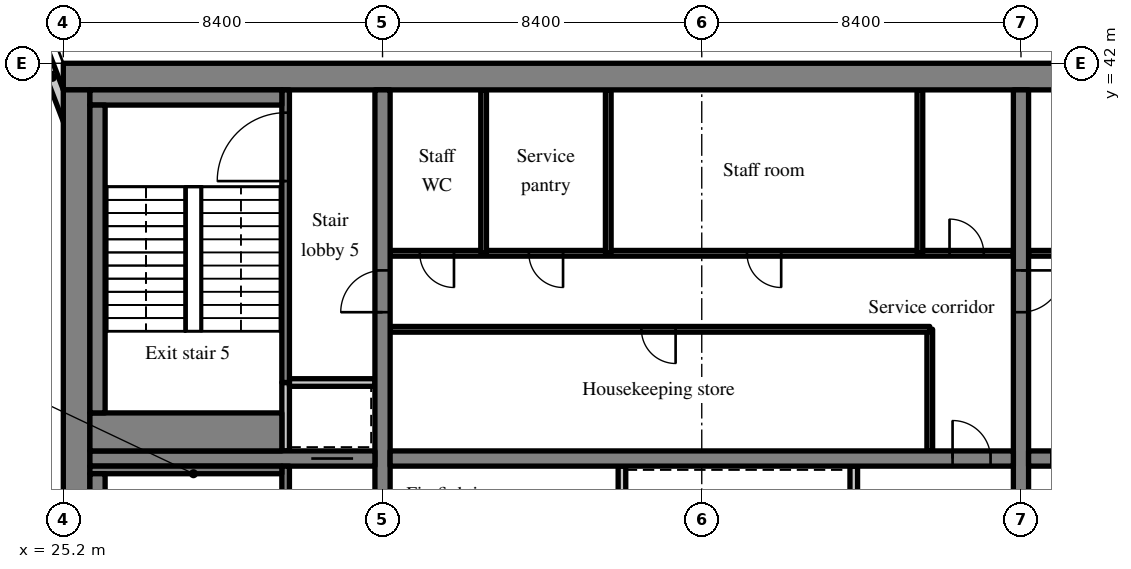
"""IFC4 building model, lengths in metres.
Left out: names, types, materials, properties, quantities, classifications, styles, units other than length and angle.
Written with IfcOpenShell. Run it as: python <this file> out.ifc"""

import sys

from ifc_helpers import new_model, si_unit, direction, frame, frame_2d, origin, place, context, subcontext, project, spatial, rectangle, extrude, source, transform, mapped, element, fill, save


model = new_model("IFC4")
c1 = context("Model", 3, precision=1e-05, world=origin(), true_north=direction((0.0, 1.0)))
c2 = subcontext(c1, "Body", "Model", "MODEL_VIEW")
j1 = project(units=[si_unit("LENGTHUNIT", "METRE"), si_unit("PLANEANGLEUNIT", "RADIAN")], contexts=[c1])
p1 = place(None, origin())
s1 = spatial("IfcSite", under=j1, at=p1, CompositionType="ELEMENT")
p2 = place(p1, origin())
s2 = spatial("IfcBuilding", under=s1, at=p2, CompositionType="ELEMENT")
p3 = place(p2, frame((0.0, 0.0, 197.2)))
s3 = spatial("IfcBuildingStorey", under=s2, at=p3, CompositionType="ELEMENT", Elevation=197.2)
m1 = source(origin(), c2, "Body", "SweptSolid", [
    extrude(rectangle(XDim=50.4, YDim=0.7, at=frame_2d((25.2, 0.0))), origin(), (0.0, 0.0, 1.0), 3.52),
])
p4 = place(p3, frame((25.2, 41.65, 0.0), z_axis=(0.0, 0.0, 1.0), x_axis=(1.0, 0.0, 0.0)))
e1 = element("IfcWall", 1, at=p4, inside=s3, PredefinedType="SHEAR", context=c2, shape_type="MappedRepresentation", body=[
    mapped(m1, transform((0.0, 0.0, 0.0), scale=1.0)),
])
m2 = source(origin(), c2, "Body", "SweptSolid", [
    extrude(rectangle(XDim=18.6, YDim=0.7, at=frame_2d((9.3, 0.0))), origin(), (0.0, 0.0, 1.0), 3.52),
])
p5 = place(p3, frame((25.55, 22.7, 0.0), z_axis=(0.0, 0.0, 1.0), x_axis=(0.0, 1.0, 0.0)))
e2 = element("IfcWall", 2, at=p5, inside=s3, PredefinedType="SHEAR", context=c2, shape_type="MappedRepresentation", body=[
    mapped(m2, transform((0.0, 0.0, 0.0), scale=1.0)),
])
m3 = source(origin(), c2, "Body", "SweptSolid", [
    extrude(rectangle(XDim=18.6, YDim=0.4, at=frame_2d((9.3, 0.0))), origin(), (0.0, 0.0, 1.0), 3.52),
])
p6 = place(p3, frame((33.6, 22.7, 0.0), z_axis=(0.0, 0.0, 1.0), x_axis=(0.0, 1.0, 0.0)))
e3 = element("IfcWall", 3, at=p6, inside=s3, PredefinedType="SHEAR", context=c2, shape_type="MappedRepresentation", body=[
    mapped(m3, transform((0.0, 0.0, 0.0), scale=1.0)),
])
m4 = source(origin(), c2, "Body", "SweptSolid", [
    extrude(rectangle(XDim=1.1, YDim=2.1, at=frame_2d((0.55, 1.05))), frame((0.0, 0.21, 0.0), z_axis=(0.0, -1.0, 0.0), x_axis=(1.0, 0.0, 0.0)), (0.0, 0.0, 1.0), 0.42),
])
p7 = place(p6, frame((12.75, 0.0, 0.0)))
e4 = element("IfcOpeningElement", 4, at=p7, cuts=e3, PredefinedType="OPENING", context=c2, shape_type="MappedRepresentation", body=[
    mapped(m4, transform((0.0, 0.0, 0.0), scale=1.0)),
])
p8 = place(p3, frame((50.4, 22.7, 0.0), z_axis=(0.0, 0.0, 1.0), x_axis=(0.0, 1.0, 0.0)))
e5 = element("IfcWall", 5, at=p8, inside=s3, PredefinedType="SHEAR", context=c2, shape_type="MappedRepresentation", body=[
    mapped(m3, transform((0.0, 0.0, 0.0), scale=1.0)),
])
p9 = place(p8, frame((12.75, 0.0, 0.0)))
e6 = element("IfcOpeningElement", 6, at=p9, cuts=e5, PredefinedType="OPENING", context=c2, shape_type="MappedRepresentation", body=[
    mapped(m4, transform((0.0, 0.0, 0.0), scale=1.0)),
])
m5 = source(origin(), c2, "Body", "SweptSolid", [
    extrude(rectangle(XDim=7.5, YDim=0.4, at=frame_2d((3.75, 0.0))), origin(), (0.0, 0.0, 1.0), 3.52),
])
p10 = place(p3, frame((25.9, 31.6, 0.0), z_axis=(0.0, 0.0, 1.0), x_axis=(1.0, 0.0, 0.0)))
e7 = element("IfcWall", 7, at=p10, inside=s3, PredefinedType="SHEAR", context=c2, shape_type="MappedRepresentation", body=[
    mapped(m5, transform((0.0, 0.0, 0.0), scale=1.0)),
])
p11 = place(p10, frame((5.825, 0.0, 0.0)))
e8 = element("IfcOpeningElement", 8, at=p11, cuts=e7, PredefinedType="OPENING", context=c2, shape_type="MappedRepresentation", body=[
    mapped(m4, transform((0.0, 0.0, 0.0), scale=1.0)),
])
m6 = source(origin(), c2, "Body", "SweptSolid", [
    extrude(rectangle(XDim=16.4, YDim=0.4, at=frame_2d((8.2, 0.0))), origin(), (0.0, 0.0, 1.0), 3.52),
])
p12 = place(p3, frame((33.8, 31.6, 0.0), z_axis=(0.0, 0.0, 1.0), x_axis=(1.0, 0.0, 0.0)))
e9 = element("IfcWall", 9, at=p12, inside=s3, PredefinedType="SHEAR", context=c2, shape_type="MappedRepresentation", body=[
    mapped(m6, transform((0.0, 0.0, 0.0), scale=1.0)),
])
m7 = source(origin(), c2, "Body", "SweptSolid", [
    extrude(rectangle(XDim=1.0, YDim=2.1, at=frame_2d((0.5, 1.05))), frame((0.0, 0.21, 0.0), z_axis=(0.0, -1.0, 0.0), x_axis=(1.0, 0.0, 0.0)), (0.0, 0.0, 1.0), 0.42),
])
p13 = place(p12, frame((14.8, 0.0, 0.0)))
e10 = element("IfcOpeningElement", 10, at=p13, cuts=e9, PredefinedType="OPENING", context=c2, shape_type="MappedRepresentation", body=[
    mapped(m7, transform((0.0, 0.0, 0.0), scale=1.0)),
])
p14 = place(p3, frame((50.6, 31.6, 0.0), z_axis=(0.0, 0.0, 1.0), x_axis=(1.0, 0.0, 0.0)))
e11 = element("IfcWall", 11, at=p14, inside=s3, PredefinedType="SHEAR", context=c2, shape_type="MappedRepresentation", body=[
    mapped(m6, transform((0.0, 0.0, 0.0), scale=1.0)),
])
p15 = place(p14, frame((0.6, 0.0, 0.0)))
e12 = element("IfcOpeningElement", 12, at=p15, cuts=e11, PredefinedType="OPENING", context=c2, shape_type="MappedRepresentation", body=[
    mapped(m7, transform((0.0, 0.0, 0.0), scale=1.0)),
])
m8 = source(origin(), c2, "Body", "SweptSolid", [
    extrude(rectangle(XDim=3.559, YDim=0.3, at=frame_2d((1.78, 0.0))), origin(), (0.0, 0.0, 1.0), 3.52),
])
p16 = place(p3, frame((25.55, 39.969, 0.0), z_axis=(0.0, 0.0, 1.0), x_axis=(-0.35779745313, 0.933799219604, 0.0)))
e13 = element("IfcWall", 13, at=p16, inside=s3, PredefinedType="SOLIDWALL", context=c2, shape_type="MappedRepresentation", body=[
    mapped(m8, transform((0.0, 0.0, 0.0), scale=1.0)),
])
m9 = source(origin(), c2, "Body", "SweptSolid", [
    extrude(rectangle(XDim=1.5, YDim=2.0, at=frame_2d((0.75, 1.0))), frame((0.0, 0.16, 0.0), z_axis=(0.0, -1.0, 0.0), x_axis=(1.0, 0.0, 0.0)), (0.0, 0.0, 1.0), 0.32),
])
p17 = place(p16, frame((1.903, 0.0, 0.9)))
e14 = element("IfcOpeningElement", 14, at=p17, cuts=e13, PredefinedType="OPENING", context=c2, shape_type="MappedRepresentation", body=[
    mapped(m9, transform((0.0, 0.0, 0.0), scale=1.0)),
])
m10 = source(origin(), c2, "Body", "SweptSolid", [
    extrude(rectangle(XDim=8.7, YDim=0.2, at=frame_2d((4.35, 0.0))), origin(), (0.0, 0.0, 1.0), 3.52),
])
p18 = place(p3, frame((39.9, 22.7, 0.0), z_axis=(0.0, 0.0, 1.0), x_axis=(0.0, 1.0, 0.0)))
e15 = element("IfcWall", 15, at=p18, inside=s3, PredefinedType="PARTITIONING", context=c2, shape_type="MappedRepresentation", body=[
    mapped(m10, transform((0.0, 0.0, 0.0), scale=1.0)),
])
m11 = source(origin(), c2, "Body", "SweptSolid", [
    extrude(rectangle(XDim=0.9, YDim=2.1, at=frame_2d((0.45, 1.05))), frame((0.0, 0.11, 0.0), z_axis=(0.0, -1.0, 0.0), x_axis=(1.0, 0.0, 0.0)), (0.0, 0.0, 1.0), 0.22),
])
p19 = place(p18, frame((3.85, 0.0, 0.0)))
e16 = element("IfcOpeningElement", 16, at=p19, cuts=e15, PredefinedType="OPENING", context=c2, shape_type="MappedRepresentation", body=[
    mapped(m11, transform((0.0, 0.0, 0.0), scale=1.0)),
])
m12 = source(origin(), c2, "Body", "SweptSolid", [
    extrude(rectangle(XDim=2.6, YDim=0.2, at=frame_2d((1.3, 0.0))), origin(), (0.0, 0.0, 1.0), 3.52),
])
p20 = place(p3, frame((46.0, 28.8, 0.0), z_axis=(0.0, 0.0, 1.0), x_axis=(0.0, 1.0, 0.0)))
e17 = element("IfcWall", 17, at=p20, inside=s3, PredefinedType="SOLIDWALL", context=c2, shape_type="MappedRepresentation", body=[
    mapped(m12, transform((0.0, 0.0, 0.0), scale=1.0)),
])
m13 = source(origin(), c2, "Body", "SweptSolid", [
    extrude(rectangle(XDim=3.2, YDim=0.15, at=frame_2d((1.6, 0.0))), origin(), (0.0, 0.0, 1.0), 3.52),
])
p21 = place(p3, frame((48.0, 31.8, 0.0), z_axis=(0.0, 0.0, 1.0), x_axis=(0.0, 1.0, 0.0)))
e18 = element("IfcWall", 18, at=p21, inside=s3, PredefinedType="PARTITIONING", context=c2, shape_type="MappedRepresentation", body=[
    mapped(m13, transform((0.0, 0.0, 0.0), scale=1.0)),
])
m14 = source(origin(), c2, "Body", "SweptSolid", [
    extrude(rectangle(XDim=14.2, YDim=0.15, at=frame_2d((7.1, 0.0))), origin(), (0.0, 0.0, 1.0), 3.52),
])
p22 = place(p3, frame((33.8, 35.0, 0.0), z_axis=(0.0, 0.0, 1.0), x_axis=(1.0, 0.0, 0.0)))
e19 = element("IfcWall", 19, at=p22, inside=s3, PredefinedType="PARTITIONING", context=c2, shape_type="MappedRepresentation", body=[
    mapped(m14, transform((0.0, 0.0, 0.0), scale=1.0)),
])
m15 = source(origin(), c2, "Body", "SweptSolid", [
    extrude(rectangle(XDim=0.9, YDim=2.1, at=frame_2d((0.45, 1.05))), frame((0.0, 0.085, 0.0), z_axis=(0.0, -1.0, 0.0), x_axis=(1.0, 0.0, 0.0)), (0.0, 0.0, 1.0), 0.17),
])
p23 = place(p22, frame((6.612, 0.0, 0.0)))
e20 = element("IfcOpeningElement", 20, at=p23, cuts=e19, PredefinedType="OPENING", context=c2, shape_type="MappedRepresentation", body=[
    mapped(m15, transform((0.0, 0.0, 0.0), scale=1.0)),
])
m16 = source(origin(), c2, "Body", "SweptSolid", [
    extrude(rectangle(XDim=16.4, YDim=0.15, at=frame_2d((8.2, 0.0))), origin(), (0.0, 0.0, 1.0), 3.52),
])
p24 = place(p3, frame((33.8, 37.0, 0.0), z_axis=(0.0, 0.0, 1.0), x_axis=(1.0, 0.0, 0.0)))
e21 = element("IfcWall", 21, at=p24, inside=s3, PredefinedType="PARTITIONING", context=c2, shape_type="MappedRepresentation", body=[
    mapped(m16, transform((0.0, 0.0, 0.0), scale=1.0)),
])
p25 = place(p24, frame((0.78, 0.0, 0.0)))
e22 = element("IfcOpeningElement", 22, at=p25, cuts=e21, PredefinedType="OPENING", context=c2, shape_type="MappedRepresentation", body=[
    mapped(m15, transform((0.0, 0.0, 0.0), scale=1.0)),
])
p26 = place(p24, frame((3.65, 0.0, 0.0)))
e23 = element("IfcOpeningElement", 23, at=p26, cuts=e21, PredefinedType="OPENING", context=c2, shape_type="MappedRepresentation", body=[
    mapped(m15, transform((0.0, 0.0, 0.0), scale=1.0)),
])
p27 = place(p24, frame((9.39, 0.0, 0.0)))
e24 = element("IfcOpeningElement", 24, at=p27, cuts=e21, PredefinedType="OPENING", context=c2, shape_type="MappedRepresentation", body=[
    mapped(m15, transform((0.0, 0.0, 0.0), scale=1.0)),
])
p28 = place(p24, frame((14.72, 0.0, 0.0)))
e25 = element("IfcOpeningElement", 25, at=p28, cuts=e21, PredefinedType="OPENING", context=c2, shape_type="MappedRepresentation", body=[
    mapped(m15, transform((0.0, 0.0, 0.0), scale=1.0)),
])
m17 = source(origin(), c2, "Body", "SweptSolid", [
    extrude(rectangle(XDim=4.3, YDim=0.15, at=frame_2d((2.15, 0.0))), origin(), (0.0, 0.0, 1.0), 3.52),
])
for number, where, z_axis, x_axis in (
    (26, (36.26, 37.0, 0.0), (0.0, 0.0, 1.0), (0.0, 1.0, 0.0)),
    (27, (39.54, 37.0, 0.0), (0.0, 0.0, 1.0), (0.0, 1.0, 0.0)),
    (28, (47.74, 37.0, 0.0), (0.0, 0.0, 1.0), (0.0, 1.0, 0.0)),
):
    element("IfcWall", number, at=place(p3, frame(where, z_axis=z_axis, x_axis=x_axis)), inside=s3, PredefinedType="PARTITIONING", context=c2, shape_type="MappedRepresentation", body=[
        mapped(m17, transform((0.0, 0.0, 0.0), scale=1.0)),
    ])
p29 = place(p3, frame((67.0, 37.0, 0.0), z_axis=(0.0, 0.0, 1.0), x_axis=(-1.0, 0.0, 0.0)))
e29 = element("IfcWall", 29, at=p29, inside=s3, PredefinedType="PARTITIONING", context=c2, shape_type="MappedRepresentation", body=[
    mapped(m16, transform((0.0, 0.0, 0.0), scale=1.0)),
])
p30 = place(p29, frame((6.52, 0.0, 0.0)))
e30 = element("IfcOpeningElement", 30, at=p30, cuts=e29, PredefinedType="OPENING", context=c2, shape_type="MappedRepresentation", body=[
    mapped(m15, transform((0.0, 0.0, 0.0), scale=1.0)),
])
p31 = place(p29, frame((14.72, 0.0, 0.0)))
e31 = element("IfcOpeningElement", 31, at=p31, cuts=e29, PredefinedType="OPENING", context=c2, shape_type="MappedRepresentation", body=[
    mapped(m15, transform((0.0, 0.0, 0.0), scale=1.0)),
])
m18 = source(origin(), c2, "Body", "SweptSolid", [
    extrude(rectangle(XDim=8.7, YDim=0.2, at=frame_2d((4.35, 0.0))), origin(), (0.0, 0.0, 1.0), 3.52),
])
p32 = place(p3, frame((31.05, 22.7, 0.0), z_axis=(0.0, 0.0, 1.0), x_axis=(0.0, 1.0, 0.0)))
e32 = element("IfcWall", 32, at=p32, inside=s3, PredefinedType="SOLIDWALL", context=c2, shape_type="MappedRepresentation", body=[
    mapped(m18, transform((0.0, 0.0, 0.0), scale=1.0)),
])
m19 = source(origin(), c2, "Body", "SweptSolid", [
    extrude(rectangle(XDim=1.2, YDim=2.1, at=frame_2d((0.6, 1.05))), frame((0.0, 0.11, 0.0), z_axis=(0.0, -1.0, 0.0), x_axis=(1.0, 0.0, 0.0)), (0.0, 0.0, 1.0), 0.22),
])
p33 = place(p32, frame((6.8, 0.0, 0.0)))
e33 = element("IfcOpeningElement", 33, at=p33, cuts=e32, PredefinedType="OPENING", context=c2, shape_type="MappedRepresentation", body=[
    mapped(m19, transform((0.0, 0.0, 0.0), scale=1.0)),
])
m20 = source(origin(), c2, "Body", "SweptSolid", [
    extrude(rectangle(XDim=1.8, YDim=0.2, at=frame_2d((0.9, 0.0))), origin(), (0.0, 0.0, 1.0), 3.52),
])
p34 = place(p3, frame((31.05, 31.8, 0.0), z_axis=(0.0, 0.0, 1.0), x_axis=(0.0, 1.0, 0.0)))
e34 = element("IfcWall", 34, at=p34, inside=s3, PredefinedType="SOLIDWALL", context=c2, shape_type="MappedRepresentation", body=[
    mapped(m20, transform((0.0, 0.0, 0.0), scale=1.0)),
])
m21 = source(origin(), c2, "Body", "SweptSolid", [
    extrude(rectangle(XDim=2.25, YDim=0.2, at=frame_2d((1.125, 0.0))), origin(), (0.0, 0.0, 1.0), 3.52),
])
p35 = place(p3, frame((31.15, 33.6, 0.0), z_axis=(0.0, 0.0, 1.0), x_axis=(1.0, 0.0, 0.0)))
e35 = element("IfcWall", 35, at=p35, inside=s3, PredefinedType="SOLIDWALL", context=c2, shape_type="MappedRepresentation", body=[
    mapped(m21, transform((0.0, 0.0, 0.0), scale=1.0)),
])
m22 = source(origin(), c2, "Body", "SweptSolid", [
    extrude(rectangle(XDim=7.7, YDim=0.2, at=frame_2d((3.85, 0.0))), origin(), (0.0, 0.0, 1.0), 3.52),
])
p36 = place(p3, frame((31.05, 33.6, 0.0), z_axis=(0.0, 0.0, 1.0), x_axis=(0.0, 1.0, 0.0)))
e36 = element("IfcWall", 36, at=p36, inside=s3, PredefinedType="SOLIDWALL", context=c2, shape_type="MappedRepresentation", body=[
    mapped(m22, transform((0.0, 0.0, 0.0), scale=1.0)),
])
m23 = source(origin(), c2, "Body", "SweptSolid", [
    extrude(rectangle(XDim=1.8, YDim=2.1, at=frame_2d((0.9, 1.05))), frame((0.0, 0.11, 0.0), z_axis=(0.0, -1.0, 0.0), x_axis=(1.0, 0.0, 0.0)), (0.0, 0.0, 1.0), 0.22),
])
p37 = place(p36, frame((5.3, 0.0, 0.0)))
e37 = element("IfcOpeningElement", 37, at=p37, cuts=e36, PredefinedType="OPENING", context=c2, shape_type="MappedRepresentation", body=[
    mapped(m23, transform((0.0, 0.0, 0.0), scale=1.0)),
])
m24 = source(origin(), c2, "Body", "SweptSolid", [
    extrude(rectangle(XDim=5.05, YDim=0.2, at=frame_2d((2.525, 0.0))), origin(), (0.0, 0.0, 1.0), 3.52),
])
p38 = place(p3, frame((25.9, 31.3, 0.0), z_axis=(0.0, 0.0, 1.0), x_axis=(1.0, 0.0, 0.0)))
e38 = element("IfcWall", 38, at=p38, inside=s3, PredefinedType="SOLIDWALL", context=c2, shape_type="MappedRepresentation", body=[
    mapped(m24, transform((0.0, 0.0, 0.0), scale=1.0)),
])
m25 = source(origin(), c2, "Body", "SweptSolid", [
    extrude(rectangle(XDim=8.1, YDim=0.4, at=frame_2d((4.05, 0.0))), origin(), (0.0, 0.0, 1.0), 3.52),
])
p39 = place(p3, frame((26.1, 23.1, 0.0), z_axis=(0.0, 0.0, 1.0), x_axis=(0.0, 1.0, 0.0)))
e39 = element("IfcWall", 39, at=p39, inside=s3, PredefinedType="SOLIDWALL", context=c2, shape_type="MappedRepresentation", body=[
    mapped(m25, transform((0.0, 0.0, 0.0), scale=1.0)),
])
m26 = source(origin(), c2, "Body", "SweptSolid", [
    extrude(rectangle(XDim=5.05, YDim=0.4, at=frame_2d((2.525, 0.0))), origin(), (0.0, 0.0, 1.0), 3.52),
])
p40 = place(p3, frame((25.9, 41.1, 0.0), z_axis=(0.0, 0.0, 1.0), x_axis=(1.0, 0.0, 0.0)))
e40 = element("IfcWall", 40, at=p40, inside=s3, PredefinedType="SOLIDWALL", context=c2, shape_type="MappedRepresentation", body=[
    mapped(m26, transform((0.0, 0.0, 0.0), scale=1.0)),
])
m27 = source(origin(), c2, "Body", "SweptSolid", [
    extrude(rectangle(XDim=5.05, YDim=1.0, at=frame_2d((2.525, 0.0))), origin(), (0.0, 0.0, 1.0), 3.52),
])
p41 = place(p3, frame((25.9, 32.3, 0.0), z_axis=(0.0, 0.0, 1.0), x_axis=(1.0, 0.0, 0.0)))
e41 = element("IfcWall", 41, at=p41, inside=s3, PredefinedType="SOLIDWALL", context=c2, shape_type="MappedRepresentation", body=[
    mapped(m27, transform((0.0, 0.0, 0.0), scale=1.0)),
])
p42 = place(p3, frame((26.1, 32.8, 0.0), z_axis=(0.0, 0.0, 1.0), x_axis=(0.0, 1.0, 0.0)))
e42 = element("IfcWall", 42, at=p42, inside=s3, PredefinedType="SOLIDWALL", context=c2, shape_type="MappedRepresentation", body=[
    mapped(m25, transform((0.0, 0.0, 0.0), scale=1.0)),
])
m28 = source(origin(), c2, "Body", "SweptSolid", [
    extrude(rectangle(XDim=1.0, YDim=2.1, at=frame_2d((0.5, 1.05))), frame((0.0, 0.025, 0.0), z_axis=(0.0, -1.0, 0.0), x_axis=(1.0, 0.0, 0.0)), (0.0, 0.0, 1.0), 0.05),
])
p43 = place(p13, origin())
e43 = element("IfcDoor", 43, at=p43, inside=s3, OperationType="SINGLE_SWING_LEFT", PredefinedType="DOOR", context=c2, shape_type="MappedRepresentation", body=[
    mapped(m28, transform((0.0, 0.0, 0.0), scale=1.0)),
])
fill(e10, e43)
m29 = source(origin(), c2, "Body", "SweptSolid", [
    extrude(rectangle(XDim=0.9, YDim=2.1, at=frame_2d((0.45, 1.05))), frame((0.0, 0.025, 0.0), z_axis=(0.0, -1.0, 0.0), x_axis=(1.0, 0.0, 0.0)), (0.0, 0.0, 1.0), 0.05),
])
p44 = place(p23, origin())
e44 = element("IfcDoor", 44, at=p44, inside=s3, OperationType="SINGLE_SWING_RIGHT", PredefinedType="DOOR", context=c2, shape_type="MappedRepresentation", body=[
    mapped(m29, transform((0.0, 0.0, 0.0), scale=1.0)),
])
fill(e20, e44)
p45 = place(p25, origin())
e45 = element("IfcDoor", 45, at=p45, inside=s3, OperationType="SINGLE_SWING_RIGHT", PredefinedType="DOOR", context=c2, shape_type="MappedRepresentation", body=[
    mapped(m29, transform((0.0, 0.0, 0.0), scale=1.0)),
])
fill(e22, e45)
p46 = place(p26, origin())
e46 = element("IfcDoor", 46, at=p46, inside=s3, OperationType="SINGLE_SWING_RIGHT", PredefinedType="DOOR", context=c2, shape_type="MappedRepresentation", body=[
    mapped(m29, transform((0.0, 0.0, 0.0), scale=1.0)),
])
fill(e23, e46)
p47 = place(p27, origin())
e47 = element("IfcDoor", 47, at=p47, inside=s3, OperationType="SINGLE_SWING_RIGHT", PredefinedType="DOOR", context=c2, shape_type="MappedRepresentation", body=[
    mapped(m29, transform((0.0, 0.0, 0.0), scale=1.0)),
])
fill(e24, e47)
p48 = place(p28, origin())
e48 = element("IfcDoor", 48, at=p48, inside=s3, OperationType="SINGLE_SWING_LEFT", PredefinedType="DOOR", context=c2, shape_type="MappedRepresentation", body=[
    mapped(m29, transform((0.0, 0.0, 0.0), scale=1.0)),
])
fill(e25, e48)
m30 = source(origin(), c2, "Body", "SweptSolid", [
    extrude(rectangle(XDim=1.1, YDim=2.1, at=frame_2d((0.55, 1.05))), frame((0.0, 0.025, 0.0), z_axis=(0.0, -1.0, 0.0), x_axis=(1.0, 0.0, 0.0)), (0.0, 0.0, 1.0), 0.05),
])
p49 = place(p11, origin())
e49 = element("IfcDoor", 49, at=p49, inside=s3, OperationType="SLIDING_TO_RIGHT", PredefinedType="DOOR", context=c2, shape_type="MappedRepresentation", body=[
    mapped(m30, transform((0.0, 0.0, 0.0), scale=1.0)),
])
fill(e8, e49)
m31 = source(origin(), c2, "Body", "SweptSolid", [
    extrude(rectangle(XDim=1.8, YDim=2.1, at=frame_2d((0.9, 1.05))), frame((0.0, 0.025, 0.0), z_axis=(0.0, -1.0, 0.0), x_axis=(1.0, 0.0, 0.0)), (0.0, 0.0, 1.0), 0.05),
])
p50 = place(p37, origin())
e50 = element("IfcDoor", 50, at=p50, inside=s3, OperationType="SINGLE_SWING_LEFT", PredefinedType="DOOR", context=c2, shape_type="MappedRepresentation", body=[
    mapped(m31, transform((0.0, 0.0, 0.0), scale=1.0)),
])
fill(e37, e50)
p51 = place(p7, origin())
e51 = element("IfcDoor", 51, at=p51, inside=s3, OperationType="SINGLE_SWING_LEFT", PredefinedType="DOOR", context=c2, shape_type="MappedRepresentation", body=[
    mapped(m30, transform((0.0, 0.0, 0.0), scale=1.0)),
])
fill(e4, e51)
p52 = place(p9, origin())
e52 = element("IfcDoor", 52, at=p52, inside=s3, OperationType="SINGLE_SWING_RIGHT", PredefinedType="DOOR", context=c2, shape_type="MappedRepresentation", body=[
    mapped(m30, transform((0.0, 0.0, 0.0), scale=1.0)),
])
fill(e6, e52)
save(model, sys.argv[1])
